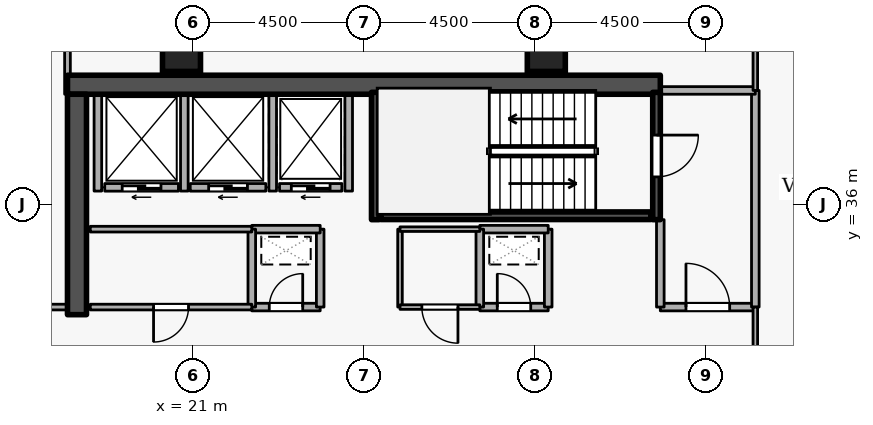
"""IFC4 building model, lengths in metres.
Left out: names, types, materials, properties, quantities, classifications, styles, units other than length and angle.
Written with IfcOpenShell. Run it as: python <this file> out.ifc"""

import sys

from ifc_helpers import new_model, si_unit, direction, frame, frame_2d, origin, origin_2d, place, context, subcontext, project, spatial, rectangle, extrude, element, fill, save


model = new_model("IFC4")
c1 = context("Model", 3, precision=1e-05, world=origin(), true_north=direction((0.0, 1.0)))
c2 = subcontext(c1, "Body", "Model", "MODEL_VIEW")
j1 = project(units=[si_unit("LENGTHUNIT", "METRE"), si_unit("PLANEANGLEUNIT", "RADIAN")], contexts=[c1])
p1 = place(None, origin())
s1 = spatial("IfcSite", under=j1, at=p1, CompositionType="ELEMENT")
p2 = place(p1, origin())
s2 = spatial("IfcBuilding", under=s1, at=p2, CompositionType="ELEMENT")
p3 = place(p2, frame((0.0, 0.0, 207.3)))
s3 = spatial("IfcBuildingStorey", under=s2, at=p3, CompositionType="ELEMENT", Elevation=207.3)
p4 = place(p3, frame((17.7, 39.15, 0.0), z_axis=(0.0, 0.0, 1.0), x_axis=(1.0, 0.0, 0.0)))
e1 = element("IfcWall", 1, at=p4, inside=s3, PredefinedType="SHEAR", context=c2, shape_type="SweptSolid", body=[
    extrude(rectangle(XDim=15.6, YDim=0.5, at=frame_2d((7.8, 0.0))), origin(), (0.0, 0.0, 1.0), 3.6),
])
p5 = place(p3, frame((17.95, 33.1, 0.0), z_axis=(0.0, 0.0, 1.0), x_axis=(0.0, 1.0, 0.0)))
e2 = element("IfcWall", 2, at=p5, inside=s3, PredefinedType="SHEAR", context=c2, shape_type="SweptSolid", body=[
    extrude(rectangle(XDim=5.8, YDim=0.5, at=frame_2d((2.9, 0.0))), origin(), (0.0, 0.0, 1.0), 3.6),
])
for number, where, z_axis, x_axis in (
    (3, (20.7, 40.0, 0.0), (0.0, 0.0, 1.0), (1.0, 0.0, 0.0)),
    (4, (30.3, 40.0, 0.0), (0.0, 0.0, 1.0), (1.0, 0.0, 0.0)),
):
    element("IfcColumn", number, at=place(p3, frame(where, z_axis=z_axis, x_axis=x_axis)), inside=s3, PredefinedType="COLUMN", context=c2, shape_type="SweptSolid", body=[
        extrude(rectangle(XDim=1.0, YDim=1.0, at=origin_2d()), origin(), (0.0, 0.0, 1.0), 3.6),
    ])
p6 = place(p3, frame((24.92, 36.45, 0.0), z_axis=(0.0, 0.0, 1.0), x_axis=(-1.0, 0.0, 0.0)))
e5 = element("IfcWall", 5, at=p6, inside=s3, PredefinedType="STANDARD", context=c2, shape_type="SweptSolid", body=[
    extrude(rectangle(XDim=1.64, YDim=0.2, at=frame_2d((0.82, 0.0))), origin(), (0.0, 0.0, 1.0), 3.34),
])
p7 = place(p6, frame((0.31, 0.0, 0.0)))
e6 = element("IfcOpeningElement", 6, at=p7, cuts=e5, PredefinedType="OPENING", context=c2, shape_type="SweptSolid", body=[
    extrude(rectangle(XDim=1.02, YDim=2.06, at=frame_2d((0.51, 1.03))), frame((0.0, 0.11, 0.0), z_axis=(0.0, -1.0, 0.0), x_axis=(1.0, 0.0, 0.0)), (0.0, 0.0, 1.0), 0.22),
])
p8 = place(p3, frame((22.92, 36.45, 0.0), z_axis=(0.0, 0.0, 1.0), x_axis=(-1.0, 0.0, 0.0)))
e7 = element("IfcWall", 7, at=p8, inside=s3, PredefinedType="STANDARD", context=c2, shape_type="SweptSolid", body=[
    extrude(rectangle(XDim=1.99, YDim=0.2, at=frame_2d((0.995, 0.0))), origin(), (0.0, 0.0, 1.0), 3.34),
])
p9 = place(p8, frame((0.485, 0.0, 0.0)))
e8 = element("IfcOpeningElement", 8, at=p9, cuts=e7, PredefinedType="OPENING", context=c2, shape_type="SweptSolid", body=[
    extrude(rectangle(XDim=1.02, YDim=2.06, at=frame_2d((0.51, 1.03))), frame((0.0, 0.11, 0.0), z_axis=(0.0, -1.0, 0.0), x_axis=(1.0, 0.0, 0.0)), (0.0, 0.0, 1.0), 0.22),
])
p10 = place(p3, frame((20.62, 36.45, 0.0), z_axis=(0.0, 0.0, 1.0), x_axis=(-1.0, 0.0, 0.0)))
e9 = element("IfcWall", 9, at=p10, inside=s3, PredefinedType="STANDARD", context=c2, shape_type="SweptSolid", body=[
    extrude(rectangle(XDim=1.94, YDim=0.2, at=frame_2d((0.97, 0.0))), origin(), (0.0, 0.0, 1.0), 3.34),
])
p11 = place(p10, frame((0.46, 0.0, 0.0)))
e10 = element("IfcOpeningElement", 10, at=p11, cuts=e9, PredefinedType="OPENING", context=c2, shape_type="SweptSolid", body=[
    extrude(rectangle(XDim=1.02, YDim=2.06, at=frame_2d((0.51, 1.03))), frame((0.0, 0.11, 0.0), z_axis=(0.0, -1.0, 0.0), x_axis=(1.0, 0.0, 0.0)), (0.0, 0.0, 1.0), 0.22),
])
for number, where, z_axis, x_axis in (
    (11, (25.1, 36.352, 0.0), (0.0, 0.0, 1.0), (0.0, 1.0, 0.0)),
    (12, (23.1, 36.352, 0.0), (0.0, 0.0, 1.0), (0.0, 1.0, 0.0)),
    (13, (20.775, 36.352, 0.0), (0.0, 0.0, 1.0), (0.0, 1.0, 0.0)),
    (14, (18.5, 36.352, 0.0), (0.0, 0.0, 1.0), (0.0, 1.0, 0.0)),
):
    element("IfcWall", number, at=place(p3, frame(where, z_axis=z_axis, x_axis=x_axis)), inside=s3, PredefinedType="STANDARD", context=c2, shape_type="SweptSolid", body=[
        extrude(rectangle(XDim=2.536, YDim=0.2, at=frame_2d((1.268, 0.0))), origin(), (0.0, 0.0, 1.0), 3.34),
    ])
p12 = place(p3, frame((33.2, 38.95, 0.0), z_axis=(0.0, 0.0, 1.0), x_axis=(0.0, -1.0, 0.0)))
e15 = element("IfcWall", 15, at=p12, inside=s3, PredefinedType="SHEAR", context=c2, shape_type="SweptSolid", body=[
    extrude(rectangle(XDim=3.35, YDim=0.2, at=frame_2d((1.675, 0.0))), origin(), (0.0, 0.0, 1.0), 3.6),
])
p13 = place(p12, frame((1.125, 0.0, 0.0)))
e16 = element("IfcOpeningElement", 16, at=p13, cuts=e15, PredefinedType="OPENING", context=c2, shape_type="SweptSolid", body=[
    extrude(rectangle(XDim=1.1, YDim=2.1, at=frame_2d((0.55, 1.05))), frame((0.0, 0.11, 0.0), z_axis=(0.0, -1.0, 0.0), x_axis=(1.0, 0.0, 0.0)), (0.0, 0.0, 1.0), 0.22),
])
p14 = place(p3, frame((25.8, 35.6, 0.0), z_axis=(0.0, 0.0, 1.0), x_axis=(0.0, 1.0, 0.0)))
e17 = element("IfcWall", 17, at=p14, inside=s3, PredefinedType="SHEAR", context=c2, shape_type="SweptSolid", body=[
    extrude(rectangle(XDim=3.35, YDim=0.2, at=frame_2d((1.675, 0.0))), origin(), (0.0, 0.0, 1.0), 3.6),
])
p15 = place(p3, frame((25.95, 35.703, 0.0), z_axis=(0.0, 0.0, 1.0), x_axis=(1.0, 0.0, 0.0)))
e18 = element("IfcWall", 18, at=p15, inside=s3, PredefinedType="SHEAR", context=c2, shape_type="SweptSolid", body=[
    extrude(rectangle(XDim=7.1, YDim=0.2, at=frame_2d((3.55, 0.0))), origin(), (0.0, 0.0, 1.0), 3.6),
])
p16 = place(p3, frame((33.3, 33.3, 0.0), z_axis=(0.0, 0.0, 1.0), x_axis=(1.0, 0.0, 0.0)))
e19 = element("IfcWall", 19, at=p16, inside=s3, PredefinedType="STANDARD", context=c2, shape_type="SweptSolid", body=[
    extrude(rectangle(XDim=2.5, YDim=0.2, at=frame_2d((1.25, 0.0))), origin(), (0.0, 0.0, 1.0), 3.34),
])
p17 = place(p16, frame((0.675, 0.0, 0.0)))
e20 = element("IfcOpeningElement", 20, at=p17, cuts=e19, PredefinedType="OPENING", context=c2, shape_type="SweptSolid", body=[
    extrude(rectangle(XDim=1.15, YDim=2.1, at=frame_2d((0.575, 1.05))), frame((0.0, 0.11, 0.0), z_axis=(0.0, -1.0, 0.0), x_axis=(1.0, 0.0, 0.0)), (0.0, 0.0, 1.0), 0.22),
])
p18 = place(p3, frame((35.8, 33.3, 0.0), z_axis=(0.0, 0.0, 1.0), x_axis=(0.0, 1.0, 0.0)))
e21 = element("IfcWall", 21, at=p18, inside=s3, PredefinedType="STANDARD", context=c2, shape_type="SweptSolid", body=[
    extrude(rectangle(XDim=5.7, YDim=0.2, at=frame_2d((2.85, 0.0))), origin(), (0.0, 0.0, 1.0), 3.34),
])
p19 = place(p3, frame((35.8, 39.0, 0.0), z_axis=(0.0, 0.0, 1.0), x_axis=(-1.0, 0.0, 0.0)))
e22 = element("IfcWall", 22, at=p19, inside=s3, PredefinedType="STANDARD", context=c2, shape_type="SweptSolid", body=[
    extrude(rectangle(XDim=2.5, YDim=0.2, at=frame_2d((1.25, 0.0))), origin(), (0.0, 0.0, 1.0), 3.34),
])
p20 = place(p3, frame((33.3, 35.6, 0.0), z_axis=(0.0, 0.0, 1.0), x_axis=(0.0, -1.0, 0.0)))
e23 = element("IfcWall", 23, at=p20, inside=s3, PredefinedType="STANDARD", context=c2, shape_type="SweptSolid", body=[
    extrude(rectangle(XDim=2.3, YDim=0.2, at=frame_2d((1.15, 0.0))), origin(), (0.0, 0.0, 1.0), 2.545),
])
p21 = place(p3, frame((22.55, 33.3, 0.0), z_axis=(0.0, 0.0, 1.0), x_axis=(1.0, 0.0, 0.0)))
e24 = element("IfcWall", 24, at=p21, inside=s3, PredefinedType="STANDARD", context=c2, shape_type="SweptSolid", body=[
    extrude(rectangle(XDim=1.8, YDim=0.2, at=frame_2d((0.9, 0.0))), origin(), (0.0, 0.0, 1.0), 3.34),
])
p22 = place(p21, frame((0.46, 0.0, 0.0)))
e25 = element("IfcOpeningElement", 25, at=p22, cuts=e24, PredefinedType="OPENING", context=c2, shape_type="SweptSolid", body=[
    extrude(rectangle(XDim=0.88, YDim=2.04, at=frame_2d((0.44, 1.02))), frame((0.0, 0.11, 0.0), z_axis=(0.0, -1.0, 0.0), x_axis=(1.0, 0.0, 0.0)), (0.0, 0.0, 1.0), 0.22),
])
p23 = place(p3, frame((24.35, 33.3, 0.0), z_axis=(0.0, 0.0, 1.0), x_axis=(0.0, 1.0, 0.0)))
e26 = element("IfcWall", 26, at=p23, inside=s3, PredefinedType="STANDARD", context=c2, shape_type="SweptSolid", body=[
    extrude(rectangle(XDim=2.05, YDim=0.2, at=frame_2d((1.025, 0.0))), origin(), (0.0, 0.0, 1.0), 3.34),
])
p24 = place(p3, frame((24.35, 35.35, 0.0), z_axis=(0.0, 0.0, 1.0), x_axis=(-1.0, 0.0, 0.0)))
e27 = element("IfcWall", 27, at=p24, inside=s3, PredefinedType="STANDARD", context=c2, shape_type="SweptSolid", body=[
    extrude(rectangle(XDim=1.8, YDim=0.2, at=frame_2d((0.9, 0.0))), origin(), (0.0, 0.0, 1.0), 3.34),
])
p25 = place(p3, frame((22.55, 35.35, 0.0), z_axis=(0.0, 0.0, 1.0), x_axis=(0.0, -1.0, 0.0)))
e28 = element("IfcWall", 28, at=p25, inside=s3, PredefinedType="STANDARD", context=c2, shape_type="SweptSolid", body=[
    extrude(rectangle(XDim=2.05, YDim=0.2, at=frame_2d((1.025, 0.0))), origin(), (0.0, 0.0, 1.0), 3.34),
])
p26 = place(p3, frame((28.55, 33.3, 0.0), z_axis=(0.0, 0.0, 1.0), x_axis=(1.0, 0.0, 0.0)))
e29 = element("IfcWall", 29, at=p26, inside=s3, PredefinedType="STANDARD", context=c2, shape_type="SweptSolid", body=[
    extrude(rectangle(XDim=1.8, YDim=0.2, at=frame_2d((0.9, 0.0))), origin(), (0.0, 0.0, 1.0), 3.34),
])
p27 = place(p26, frame((0.46, 0.0, 0.0)))
e30 = element("IfcOpeningElement", 30, at=p27, cuts=e29, PredefinedType="OPENING", context=c2, shape_type="SweptSolid", body=[
    extrude(rectangle(XDim=0.88, YDim=2.04, at=frame_2d((0.44, 1.02))), frame((0.0, 0.11, 0.0), z_axis=(0.0, -1.0, 0.0), x_axis=(1.0, 0.0, 0.0)), (0.0, 0.0, 1.0), 0.22),
])
p28 = place(p3, frame((30.35, 33.3, 0.0), z_axis=(0.0, 0.0, 1.0), x_axis=(0.0, 1.0, 0.0)))
e31 = element("IfcWall", 31, at=p28, inside=s3, PredefinedType="STANDARD", context=c2, shape_type="SweptSolid", body=[
    extrude(rectangle(XDim=2.05, YDim=0.2, at=frame_2d((1.025, 0.0))), origin(), (0.0, 0.0, 1.0), 3.34),
])
p29 = place(p3, frame((30.35, 35.35, 0.0), z_axis=(0.0, 0.0, 1.0), x_axis=(-1.0, 0.0, 0.0)))
e32 = element("IfcWall", 32, at=p29, inside=s3, PredefinedType="STANDARD", context=c2, shape_type="SweptSolid", body=[
    extrude(rectangle(XDim=1.8, YDim=0.2, at=frame_2d((0.9, 0.0))), origin(), (0.0, 0.0, 1.0), 3.34),
])
p30 = place(p3, frame((28.55, 35.35, 0.0), z_axis=(0.0, 0.0, 1.0), x_axis=(0.0, -1.0, 0.0)))
e33 = element("IfcWall", 33, at=p30, inside=s3, PredefinedType="STANDARD", context=c2, shape_type="SweptSolid", body=[
    extrude(rectangle(XDim=2.05, YDim=0.2, at=frame_2d((1.025, 0.0))), origin(), (0.0, 0.0, 1.0), 3.34),
])
p31 = place(p3, frame((18.3, 35.35, 0.0), z_axis=(0.0, 0.0, 1.0), x_axis=(1.0, 0.0, 0.0)))
e34 = element("IfcWall", 34, at=p31, inside=s3, PredefinedType="PARTITIONING", context=c2, shape_type="SweptSolid", body=[
    extrude(rectangle(XDim=4.25, YDim=0.15, at=frame_2d((2.125, 0.0))), origin(), (0.0, 0.0, 1.0), 3.34),
])
p32 = place(p3, frame((22.55, 33.3, 0.0), z_axis=(0.0, 0.0, 1.0), x_axis=(-1.0, 0.0, 0.0)))
e35 = element("IfcWall", 35, at=p32, inside=s3, PredefinedType="PARTITIONING", context=c2, shape_type="SweptSolid", body=[
    extrude(rectangle(XDim=4.25, YDim=0.15, at=frame_2d((2.125, 0.0))), origin(), (0.0, 0.0, 1.0), 3.34),
])
p33 = place(p32, frame((1.665, 0.0, 0.0)))
e36 = element("IfcOpeningElement", 36, at=p33, cuts=e35, PredefinedType="OPENING", context=c2, shape_type="SweptSolid", body=[
    extrude(rectangle(XDim=0.92, YDim=2.08, at=frame_2d((0.46, 1.04))), frame((0.0, 0.085, 0.0), z_axis=(0.0, -1.0, 0.0), x_axis=(1.0, 0.0, 0.0)), (0.0, 0.0, 1.0), 0.17),
])
p34 = place(p3, frame((26.45, 33.3, 0.0), z_axis=(0.0, 0.0, 1.0), x_axis=(0.0, 1.0, 0.0)))
e37 = element("IfcWall", 37, at=p34, inside=s3, PredefinedType="PARTITIONING", context=c2, shape_type="SweptSolid", body=[
    extrude(rectangle(XDim=2.05, YDim=0.12, at=frame_2d((1.025, 0.0))), origin(), (0.0, 0.0, 1.0), 3.34),
])
p35 = place(p3, frame((26.45, 35.35, 0.0), z_axis=(0.0, 0.0, 1.0), x_axis=(1.0, 0.0, 0.0)))
e38 = element("IfcWall", 38, at=p35, inside=s3, PredefinedType="PARTITIONING", context=c2, shape_type="SweptSolid", body=[
    extrude(rectangle(XDim=2.1, YDim=0.12, at=frame_2d((1.05, 0.0))), origin(), (0.0, 0.0, 1.0), 3.34),
])
p36 = place(p3, frame((28.55, 33.3, 0.0), z_axis=(0.0, 0.0, 1.0), x_axis=(-1.0, 0.0, 0.0)))
e39 = element("IfcWall", 39, at=p36, inside=s3, PredefinedType="PARTITIONING", context=c2, shape_type="SweptSolid", body=[
    extrude(rectangle(XDim=2.1, YDim=0.12, at=frame_2d((1.05, 0.0))), origin(), (0.0, 0.0, 1.0), 3.34),
])
p37 = place(p36, frame((0.575, 0.0, 0.0)))
e40 = element("IfcOpeningElement", 40, at=p37, cuts=e39, PredefinedType="OPENING", context=c2, shape_type="SweptSolid", body=[
    extrude(rectangle(XDim=0.95, YDim=2.1, at=frame_2d((0.475, 1.05))), frame((0.0, 0.07, 0.0), z_axis=(0.0, -1.0, 0.0), x_axis=(1.0, 0.0, 0.0)), (0.0, 0.0, 1.0), 0.14),
])
p38 = place(p3, frame((17.7, 50.72, 0.0), z_axis=(0.0, 0.0, 1.0), x_axis=(0.0, -1.0, 0.0)))
e41 = element("IfcWall", 41, at=p38, inside=s3, PredefinedType="PARTITIONING", context=c2, shape_type="SweptSolid", body=[
    extrude(rectangle(XDim=11.82, YDim=0.15, at=frame_2d((5.91, 0.0))), origin(), (0.0, 0.0, 1.0), 2.545),
])
p39 = place(p3, frame((17.7, 33.3, 0.0), z_axis=(0.0, 0.0, 1.0), x_axis=(-1.0, 0.0, 0.0)))
e42 = element("IfcWall", 42, at=p39, inside=s3, PredefinedType="PARTITIONING", context=c2, shape_type="SweptSolid", body=[
    extrude(rectangle(XDim=4.35, YDim=0.15, at=frame_2d((2.175, 0.0))), origin(), (0.0, 0.0, 1.0), 3.34),
])
p40 = place(p39, frame((1.525, 0.0, 0.0)))
e43 = element("IfcOpeningElement", 43, at=p40, cuts=e42, PredefinedType="OPENING", context=c2, shape_type="SweptSolid", body=[
    extrude(rectangle(XDim=1.3, YDim=2.12, at=frame_2d((0.65, 1.06))), frame((0.0, 0.085, 0.0), z_axis=(0.0, -1.0, 0.0), x_axis=(1.0, 0.0, 0.0)), (0.0, 0.0, 1.0), 0.17),
])
p41 = place(p3, frame((35.8, 39.0, 0.0), z_axis=(0.0, 0.0, 1.0), x_axis=(0.0, 1.0, 0.0)))
e44 = element("IfcWall", 44, at=p41, inside=s3, PredefinedType="PARTITIONING", context=c2, shape_type="SweptSolid", body=[
    extrude(rectangle(XDim=11.72, YDim=0.12, at=frame_2d((5.86, 0.0))), origin(), (0.0, 0.0, 1.0), 3.34),
])
p42 = place(p3, frame((35.8, 27.0, 0.0), z_axis=(0.0, 0.0, 1.0), x_axis=(0.0, 1.0, 0.0)))
e45 = element("IfcWall", 45, at=p42, inside=s3, PredefinedType="PARTITIONING", context=c2, shape_type="SweptSolid", body=[
    extrude(rectangle(XDim=6.3, YDim=0.12, at=frame_2d((3.15, 0.0))), origin(), (0.0, 0.0, 1.0), 3.34),
])
p43 = place(p42, frame((2.625, 0.0, 0.0)))
e46 = element("IfcOpeningElement", 46, at=p43, cuts=e45, PredefinedType="OPENING", context=c2, shape_type="SweptSolid", body=[
    extrude(rectangle(XDim=1.05, YDim=2.1, at=frame_2d((0.525, 1.05))), frame((0.0, 0.07, 0.0), z_axis=(0.0, -1.0, 0.0), x_axis=(1.0, 0.0, 0.0)), (0.0, 0.0, 1.0), 0.14),
])
p44 = place(p7, origin())
e47 = element("IfcDoor", 47, at=p44, inside=s3, OperationType="SLIDING_TO_LEFT", PredefinedType="DOOR", context=c2, shape_type="SweptSolid", body=[
    extrude(rectangle(XDim=1.02, YDim=2.06, at=frame_2d((0.51, 1.03))), frame((0.0, 0.025, 0.0), z_axis=(0.0, -1.0, 0.0), x_axis=(1.0, 0.0, 0.0)), (0.0, 0.0, 1.0), 0.05),
])
fill(e6, e47)
p45 = place(p9, origin())
e48 = element("IfcDoor", 48, at=p45, inside=s3, OperationType="SLIDING_TO_LEFT", PredefinedType="DOOR", context=c2, shape_type="SweptSolid", body=[
    extrude(rectangle(XDim=1.02, YDim=2.06, at=frame_2d((0.51, 1.03))), frame((0.0, 0.025, 0.0), z_axis=(0.0, -1.0, 0.0), x_axis=(1.0, 0.0, 0.0)), (0.0, 0.0, 1.0), 0.05),
])
fill(e8, e48)
p46 = place(p11, origin())
e49 = element("IfcDoor", 49, at=p46, inside=s3, OperationType="SLIDING_TO_LEFT", PredefinedType="DOOR", context=c2, shape_type="SweptSolid", body=[
    extrude(rectangle(XDim=1.02, YDim=2.06, at=frame_2d((0.51, 1.03))), frame((0.0, 0.025, 0.0), z_axis=(0.0, -1.0, 0.0), x_axis=(1.0, 0.0, 0.0)), (0.0, 0.0, 1.0), 0.05),
])
fill(e10, e49)
p47 = place(p13, origin())
e50 = element("IfcDoor", 50, at=p47, inside=s3, OperationType="SINGLE_SWING_LEFT", PredefinedType="DOOR", context=c2, shape_type="SweptSolid", body=[
    extrude(rectangle(XDim=1.1, YDim=2.1, at=frame_2d((0.55, 1.05))), frame((0.0, 0.025, 0.0), z_axis=(0.0, -1.0, 0.0), x_axis=(1.0, 0.0, 0.0)), (0.0, 0.0, 1.0), 0.05),
])
fill(e16, e50)
p48 = place(p17, origin())
e51 = element("IfcDoor", 51, at=p48, inside=s3, OperationType="SINGLE_SWING_LEFT", PredefinedType="DOOR", context=c2, shape_type="SweptSolid", body=[
    extrude(rectangle(XDim=1.15, YDim=2.1, at=frame_2d((0.575, 1.05))), frame((0.0, 0.025, 0.0), z_axis=(0.0, -1.0, 0.0), x_axis=(1.0, 0.0, 0.0)), (0.0, 0.0, 1.0), 0.05),
])
fill(e20, e51)
p49 = place(p22, origin())
e52 = element("IfcDoor", 52, at=p49, inside=s3, OperationType="SINGLE_SWING_RIGHT", PredefinedType="DOOR", context=c2, shape_type="SweptSolid", body=[
    extrude(rectangle(XDim=0.88, YDim=2.04, at=frame_2d((0.44, 1.02))), frame((0.0, 0.025, 0.0), z_axis=(0.0, -1.0, 0.0), x_axis=(1.0, 0.0, 0.0)), (0.0, 0.0, 1.0), 0.05),
])
fill(e25, e52)
p50 = place(p27, origin())
e53 = element("IfcDoor", 53, at=p50, inside=s3, OperationType="SINGLE_SWING_LEFT", PredefinedType="DOOR", context=c2, shape_type="SweptSolid", body=[
    extrude(rectangle(XDim=0.88, YDim=2.04, at=frame_2d((0.44, 1.02))), frame((0.0, 0.025, 0.0), z_axis=(0.0, -1.0, 0.0), x_axis=(1.0, 0.0, 0.0)), (0.0, 0.0, 1.0), 0.05),
])
fill(e30, e53)
p51 = place(p33, origin())
e54 = element("IfcDoor", 54, at=p51, inside=s3, OperationType="SINGLE_SWING_RIGHT", PredefinedType="DOOR", context=c2, shape_type="SweptSolid", body=[
    extrude(rectangle(XDim=0.92, YDim=2.08, at=frame_2d((0.46, 1.04))), frame((0.0, 0.025, 0.0), z_axis=(0.0, -1.0, 0.0), x_axis=(1.0, 0.0, 0.0)), (0.0, 0.0, 1.0), 0.05),
])
fill(e36, e54)
p52 = place(p37, origin())
e55 = element("IfcDoor", 55, at=p52, inside=s3, OperationType="SINGLE_SWING_LEFT", PredefinedType="DOOR", context=c2, shape_type="SweptSolid", body=[
    extrude(rectangle(XDim=0.95, YDim=2.1, at=frame_2d((0.475, 1.05))), frame((0.0, 0.025, 0.0), z_axis=(0.0, -1.0, 0.0), x_axis=(1.0, 0.0, 0.0)), (0.0, 0.0, 1.0), 0.05),
])
fill(e40, e55)
save(model, sys.argv[1])
